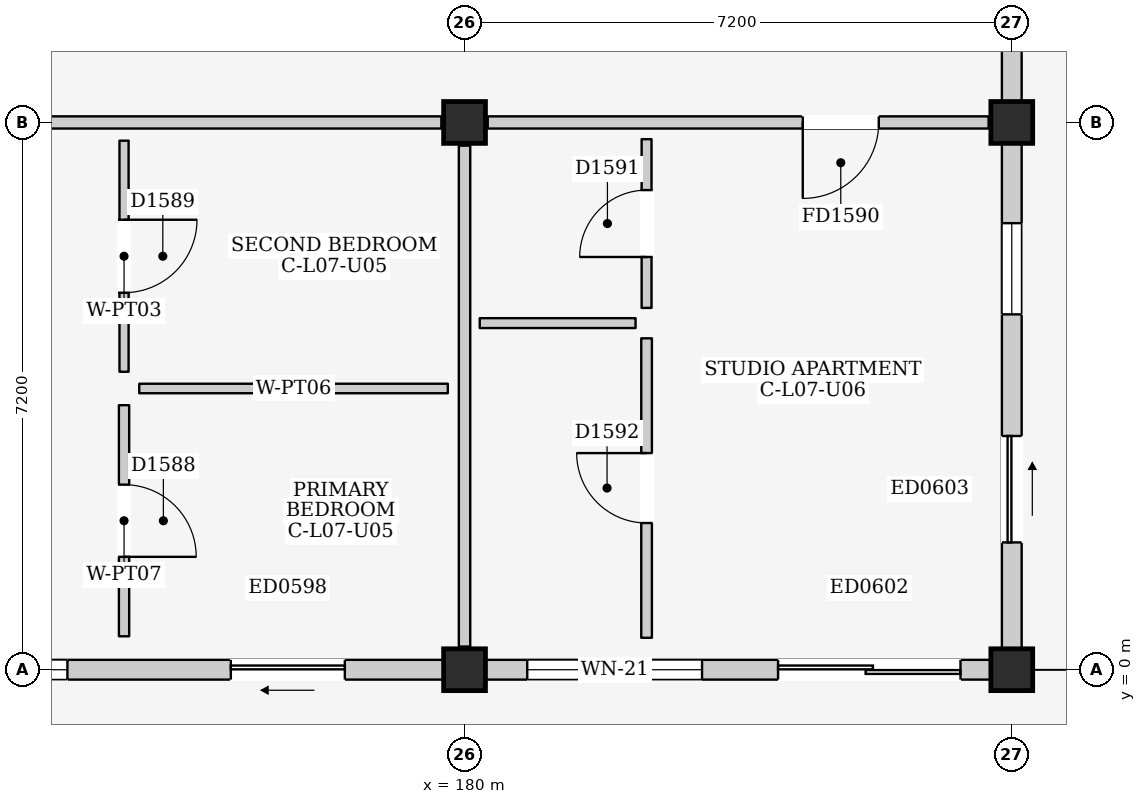
"""IFC4 building model, lengths in metres.
Left out: names, types, materials, properties, quantities, classifications, styles, units other than length and angle.
Written with IfcOpenShell. Run it as: python <this file> out.ifc"""

import sys

from ifc_helpers import new_model, si_unit, direction, frame, frame_2d, origin, origin_2d, place, context, subcontext, project, spatial, rectangle, extrude, element, fill, save


model = new_model("IFC4")
c1 = context("Model", 3, precision=1e-05, world=origin(), true_north=direction((0.0, 1.0)))
c2 = subcontext(c1, "Body", "Model", "MODEL_VIEW")
j1 = project(units=[si_unit("LENGTHUNIT", "METRE"), si_unit("PLANEANGLEUNIT", "RADIAN")], contexts=[c1])
p1 = place(None, origin())
s1 = spatial("IfcSite", under=j1, at=p1, CompositionType="ELEMENT")
p2 = place(p1, origin())
s2 = spatial("IfcBuilding", under=s1, at=p2, CompositionType="ELEMENT")
p3 = place(p2, frame((0.0, 0.0, 25.1)))
s3 = spatial("IfcBuildingStorey", under=s2, at=p3, CompositionType="ELEMENT", Elevation=25.1)
for number, where, z_axis, x_axis in (
    (1, (180.0, 0.0, 0.0), (0.0, 0.0, 1.0), (1.0, 0.0, 0.0)),
    (2, (180.0, 7.2, 0.0), (0.0, 0.0, 1.0), (1.0, 0.0, 0.0)),
    (3, (187.2, 0.0, 0.0), (0.0, 0.0, 1.0), (1.0, 0.0, 0.0)),
    (4, (187.2, 7.2, 0.0), (0.0, 0.0, 1.0), (1.0, 0.0, 0.0)),
):
    element("IfcColumn", number, at=place(p3, frame(where, z_axis=z_axis, x_axis=x_axis)), inside=s3, PredefinedType="COLUMN", context=c2, shape_type="SweptSolid", body=[
        extrude(rectangle(XDim=0.55, YDim=0.55, at=origin_2d()), origin(), (0.0, 0.0, 1.0), 3.2),
    ])
p4 = place(p3, frame((173.075, 0.0, 0.0), z_axis=(0.0, 0.0, 1.0), x_axis=(1.0, 0.0, 0.0)))
e5 = element("IfcWall", 5, at=p4, inside=s3, PredefinedType="ELEMENTEDWALL", context=c2, shape_type="SweptSolid", body=[
    extrude(rectangle(XDim=6.65, YDim=0.26, at=frame_2d((3.325, 0.0))), origin(), (0.0, 0.0, 1.0), 2.525),
])
p5 = place(p4, frame((3.85, 0.0, 0.0)))
e6 = element("IfcOpeningElement", 6, at=p5, cuts=e5, PredefinedType="OPENING", context=c2, shape_type="SweptSolid", body=[
    extrude(rectangle(XDim=1.5, YDim=2.12, at=frame_2d((0.75, 1.06))), frame((0.0, 0.145, 0.0), z_axis=(0.0, -1.0, 0.0), x_axis=(1.0, 0.0, 0.0)), (0.0, 0.0, 1.0), 0.29),
])
p6 = place(p4, frame((0.55, 0.0, 0.9)))
e7 = element("IfcOpeningElement", 7, at=p6, cuts=e5, PredefinedType="OPENING", context=c2, shape_type="SweptSolid", body=[
    extrude(rectangle(XDim=1.15, YDim=1.15, at=frame_2d((0.575, 0.575))), frame((0.0, 0.145, 0.0), z_axis=(0.0, -1.0, 0.0), x_axis=(1.0, 0.0, 0.0)), (0.0, 0.0, 1.0), 0.29),
])
p7 = place(p3, frame((180.275, 0.0, 0.0), z_axis=(0.0, 0.0, 1.0), x_axis=(1.0, 0.0, 0.0)))
e8 = element("IfcWall", 8, at=p7, inside=s3, PredefinedType="ELEMENTEDWALL", context=c2, shape_type="SweptSolid", body=[
    extrude(rectangle(XDim=6.65, YDim=0.26, at=frame_2d((3.325, 0.0))), origin(), (0.0, 0.0, 1.0), 2.525),
])
p8 = place(p7, frame((3.85, 0.0, 0.0)))
e9 = element("IfcOpeningElement", 9, at=p8, cuts=e8, PredefinedType="OPENING", context=c2, shape_type="SweptSolid", body=[
    extrude(rectangle(XDim=2.4, YDim=2.12, at=frame_2d((1.2, 1.06))), frame((0.0, 0.145, 0.0), z_axis=(0.0, -1.0, 0.0), x_axis=(1.0, 0.0, 0.0)), (0.0, 0.0, 1.0), 0.29),
])
p9 = place(p7, frame((0.55, 0.0, 0.815)))
e10 = element("IfcOpeningElement", 10, at=p9, cuts=e8, PredefinedType="OPENING", context=c2, shape_type="SweptSolid", body=[
    extrude(rectangle(XDim=2.3, YDim=1.6, at=frame_2d((1.15, 0.8))), frame((0.0, 0.145, 0.0), z_axis=(0.0, -1.0, 0.0), x_axis=(1.0, 0.0, 0.0)), (0.0, 0.0, 1.0), 0.29),
])
p10 = place(p3, frame((187.2, 0.275, 0.0), z_axis=(0.0, 0.0, 1.0), x_axis=(0.0, 1.0, 0.0)))
e11 = element("IfcWall", 11, at=p10, inside=s3, PredefinedType="ELEMENTEDWALL", context=c2, shape_type="SweptSolid", body=[
    extrude(rectangle(XDim=6.65, YDim=0.26, at=frame_2d((3.325, 0.0))), origin(), (0.0, 0.0, 1.0), 2.525),
])
p11 = place(p10, frame((1.4, 0.0, 0.0)))
e12 = element("IfcOpeningElement", 12, at=p11, cuts=e11, PredefinedType="OPENING", context=c2, shape_type="SweptSolid", body=[
    extrude(rectangle(XDim=1.4, YDim=2.1, at=frame_2d((0.7, 1.05))), frame((0.0, 0.145, 0.0), z_axis=(0.0, -1.0, 0.0), x_axis=(1.0, 0.0, 0.0)), (0.0, 0.0, 1.0), 0.29),
])
p12 = place(p10, frame((4.4, 0.0, 0.95)))
e13 = element("IfcOpeningElement", 13, at=p12, cuts=e11, PredefinedType="OPENING", context=c2, shape_type="SweptSolid", body=[
    extrude(rectangle(XDim=1.2, YDim=1.35, at=frame_2d((0.6, 0.675))), frame((0.0, 0.145, 0.0), z_axis=(0.0, -1.0, 0.0), x_axis=(1.0, 0.0, 0.0)), (0.0, 0.0, 1.0), 0.29),
])
p13 = place(p3, frame((187.2, 7.475, 0.0), z_axis=(0.0, 0.0, 1.0), x_axis=(0.0, 1.0, 0.0)))
e14 = element("IfcWall", 14, at=p13, inside=s3, PredefinedType="ELEMENTEDWALL", context=c2, shape_type="SweptSolid", body=[
    extrude(rectangle(XDim=6.65, YDim=0.26, at=frame_2d((3.325, 0.0))), origin(), (0.0, 0.0, 1.0), 2.525),
])
p14 = place(p13, frame((3.65, 0.0, 0.0)))
e15 = element("IfcOpeningElement", 15, at=p14, cuts=e14, PredefinedType="OPENING", context=c2, shape_type="SweptSolid", body=[
    extrude(rectangle(XDim=1.4, YDim=2.1, at=frame_2d((0.7, 1.05))), frame((0.0, 0.145, 0.0), z_axis=(0.0, -1.0, 0.0), x_axis=(1.0, 0.0, 0.0)), (0.0, 0.0, 1.0), 0.29),
])
p15 = place(p3, frame((173.105, 7.2, 0.0), z_axis=(0.0, 0.0, 1.0), x_axis=(1.0, 0.0, 0.0)))
e16 = element("IfcWall", 16, at=p15, inside=s3, PredefinedType="PARTITIONING", context=c2, shape_type="SweptSolid", body=[
    extrude(rectangle(XDim=6.59, YDim=0.16, at=frame_2d((3.295, 0.0))), origin(), (0.0, 0.0, 1.0), 2.375),
])
p16 = place(p15, frame((0.18, 0.0, 0.0)))
e17 = element("IfcOpeningElement", 17, at=p16, cuts=e16, PredefinedType="OPENING", context=c2, shape_type="SweptSolid", body=[
    extrude(rectangle(XDim=1.0, YDim=2.15, at=frame_2d((0.5, 1.075))), frame((0.0, 0.095, 0.0), z_axis=(0.0, -1.0, 0.0), x_axis=(1.0, 0.0, 0.0)), (0.0, 0.0, 1.0), 0.19),
])
p17 = place(p3, frame((180.0, 0.305, 0.0), z_axis=(0.0, 0.0, 1.0), x_axis=(0.0, 1.0, 0.0)))
e18 = element("IfcWall", 18, at=p17, inside=s3, PredefinedType="PARTITIONING", context=c2, shape_type="SweptSolid", body=[
    extrude(rectangle(XDim=6.59, YDim=0.15, at=frame_2d((3.295, 0.0))), origin(), (0.0, 0.0, 1.0), 2.475),
])
p18 = place(p3, frame((175.52, 0.44, 0.0), z_axis=(0.0, 0.0, 1.0), x_axis=(0.0, 1.0, 0.0)))
e19 = element("IfcWall", 19, at=p18, inside=s3, PredefinedType="PARTITIONING", context=c2, shape_type="SweptSolid", body=[
    extrude(rectangle(XDim=3.04, YDim=0.135, at=frame_2d((1.52, 0.0))), origin(), (0.0, 0.0, 1.0), 2.99),
])
p19 = place(p18, frame((1.045, 0.0, 0.0)))
e20 = element("IfcOpeningElement", 20, at=p19, cuts=e19, PredefinedType="OPENING", context=c2, shape_type="SweptSolid", body=[
    extrude(rectangle(XDim=0.95, YDim=2.15, at=frame_2d((0.475, 1.075))), frame((0.0, 0.083, 0.0), z_axis=(0.0, -1.0, 0.0), x_axis=(1.0, 0.0, 0.0)), (0.0, 0.0, 1.0), 0.165),
])
p20 = place(p3, frame((175.72, 3.7, 0.0), z_axis=(0.0, 0.0, 1.0), x_axis=(1.0, 0.0, 0.0)))
e21 = element("IfcWall", 21, at=p20, inside=s3, PredefinedType="PARTITIONING", context=c2, shape_type="SweptSolid", body=[
    extrude(rectangle(XDim=4.06, YDim=0.125, at=frame_2d((2.03, 0.0))), origin(), (0.0, 0.0, 1.0), 2.99),
])
p21 = place(p3, frame((175.52, 3.92, 0.0), z_axis=(0.0, 0.0, 1.0), x_axis=(0.0, 1.0, 0.0)))
e22 = element("IfcWall", 22, at=p21, inside=s3, PredefinedType="PARTITIONING", context=c2, shape_type="SweptSolid", body=[
    extrude(rectangle(XDim=3.04, YDim=0.12, at=frame_2d((1.52, 0.0))), origin(), (0.0, 0.0, 1.0), 2.99),
])
p22 = place(p21, frame((1.04, 0.0, 0.0)))
e23 = element("IfcOpeningElement", 23, at=p22, cuts=e22, PredefinedType="OPENING", context=c2, shape_type="SweptSolid", body=[
    extrude(rectangle(XDim=0.96, YDim=2.15, at=frame_2d((0.48, 1.075))), frame((0.0, 0.075, 0.0), z_axis=(0.0, -1.0, 0.0), x_axis=(1.0, 0.0, 0.0)), (0.0, 0.0, 1.0), 0.15),
])
p23 = place(p3, frame((180.305, 7.2, 0.0), z_axis=(0.0, 0.0, 1.0), x_axis=(1.0, 0.0, 0.0)))
e24 = element("IfcWall", 24, at=p23, inside=s3, PredefinedType="PARTITIONING", context=c2, shape_type="SweptSolid", body=[
    extrude(rectangle(XDim=6.59, YDim=0.16, at=frame_2d((3.295, 0.0))), origin(), (0.0, 0.0, 1.0), 2.375),
])
p24 = place(p23, frame((4.145, 0.0, 0.0)))
e25 = element("IfcOpeningElement", 25, at=p24, cuts=e24, PredefinedType="OPENING", context=c2, shape_type="SweptSolid", body=[
    extrude(rectangle(XDim=1.0, YDim=2.15, at=frame_2d((0.5, 1.075))), frame((0.0, 0.095, 0.0), z_axis=(0.0, -1.0, 0.0), x_axis=(1.0, 0.0, 0.0)), (0.0, 0.0, 1.0), 0.19),
])
p25 = place(p3, frame((180.2, 4.56, 0.0), z_axis=(0.0, 0.0, 1.0), x_axis=(1.0, 0.0, 0.0)))
e26 = element("IfcWall", 26, at=p25, inside=s3, PredefinedType="PARTITIONING", context=c2, shape_type="SweptSolid", body=[
    extrude(rectangle(XDim=2.05, YDim=0.13, at=frame_2d((1.025, 0.0))), origin(), (0.0, 0.0, 1.0), 2.99),
])
p26 = place(p3, frame((182.395, 4.76, 0.0), z_axis=(0.0, 0.0, 1.0), x_axis=(0.0, 1.0, 0.0)))
e27 = element("IfcWall", 27, at=p26, inside=s3, PredefinedType="PARTITIONING", context=c2, shape_type="SweptSolid", body=[
    extrude(rectangle(XDim=2.22, YDim=0.13, at=frame_2d((1.11, 0.0))), origin(), (0.0, 0.0, 1.0), 2.99),
])
p27 = place(p26, frame((0.67, 0.0, 0.0)))
e28 = element("IfcOpeningElement", 28, at=p27, cuts=e27, PredefinedType="OPENING", context=c2, shape_type="SweptSolid", body=[
    extrude(rectangle(XDim=0.88, YDim=2.1, at=frame_2d((0.44, 1.05))), frame((0.0, 0.08, 0.0), z_axis=(0.0, -1.0, 0.0), x_axis=(1.0, 0.0, 0.0)), (0.0, 0.0, 1.0), 0.16),
])
p28 = place(p3, frame((182.395, 0.42, 0.0), z_axis=(0.0, 0.0, 1.0), x_axis=(0.0, 1.0, 0.0)))
e29 = element("IfcWall", 29, at=p28, inside=s3, PredefinedType="PARTITIONING", context=c2, shape_type="SweptSolid", body=[
    extrude(rectangle(XDim=3.94, YDim=0.14, at=frame_2d((1.97, 0.0))), origin(), (0.0, 0.0, 1.0), 2.99),
])
p29 = place(p28, frame((1.51, 0.0, 0.0)))
e30 = element("IfcOpeningElement", 30, at=p29, cuts=e29, PredefinedType="OPENING", context=c2, shape_type="SweptSolid", body=[
    extrude(rectangle(XDim=0.92, YDim=2.1, at=frame_2d((0.46, 1.05))), frame((0.0, 0.085, 0.0), z_axis=(0.0, -1.0, 0.0), x_axis=(1.0, 0.0, 0.0)), (0.0, 0.0, 1.0), 0.17),
])
p30 = place(p5, frame((1.5, 0.0, 0.0), z_axis=(0.0, 0.0, 1.0), x_axis=(-1.0, 0.0, 0.0)))
e31 = element("IfcDoor", 31, at=p30, inside=s3, OperationType="SLIDING_TO_LEFT", PredefinedType="DOOR", context=c2, shape_type="SweptSolid", body=[
    extrude(rectangle(XDim=1.5, YDim=2.12, at=frame_2d((0.75, 1.06))), frame((0.0, 0.025, 0.0), z_axis=(0.0, -1.0, 0.0), x_axis=(1.0, 0.0, 0.0)), (0.0, 0.0, 1.0), 0.05),
])
fill(e6, e31)
p31 = place(p6, origin())
e32 = element("IfcWindow", 32, at=p31, inside=s3, PartitioningType="SINGLE_PANEL", PredefinedType="WINDOW", context=c2, shape_type="SweptSolid", body=[
    extrude(rectangle(XDim=1.15, YDim=1.15, at=frame_2d((0.575, 0.575))), frame((0.0, 0.03, 0.0), z_axis=(0.0, -1.0, 0.0), x_axis=(1.0, 0.0, 0.0)), (0.0, 0.0, 1.0), 0.06),
])
fill(e7, e32)
p32 = place(p8, frame((2.4, 0.0, 0.0), z_axis=(0.0, 0.0, 1.0), x_axis=(-1.0, 0.0, 0.0)))
e33 = element("IfcDoor", 33, at=p32, inside=s3, OperationType="DOUBLE_DOOR_SLIDING", PredefinedType="DOOR", context=c2, shape_type="SweptSolid", body=[
    extrude(rectangle(XDim=2.4, YDim=2.12, at=frame_2d((1.2, 1.06))), frame((0.0, 0.025, 0.0), z_axis=(0.0, -1.0, 0.0), x_axis=(1.0, 0.0, 0.0)), (0.0, 0.0, 1.0), 0.05),
])
fill(e9, e33)
p33 = place(p9, origin())
e34 = element("IfcWindow", 34, at=p33, inside=s3, PartitioningType="TRIPLE_PANEL_VERTICAL", PredefinedType="WINDOW", context=c2, shape_type="SweptSolid", body=[
    extrude(rectangle(XDim=2.3, YDim=1.6, at=frame_2d((1.15, 0.8))), frame((0.0, 0.03, 0.0), z_axis=(0.0, -1.0, 0.0), x_axis=(1.0, 0.0, 0.0)), (0.0, 0.0, 1.0), 0.06),
])
fill(e10, e34)
p34 = place(p11, frame((1.4, 0.0, 0.0), z_axis=(0.0, 0.0, 1.0), x_axis=(-1.0, 0.0, 0.0)))
e35 = element("IfcDoor", 35, at=p34, inside=s3, OperationType="SLIDING_TO_RIGHT", PredefinedType="DOOR", context=c2, shape_type="SweptSolid", body=[
    extrude(rectangle(XDim=1.4, YDim=2.1, at=frame_2d((0.7, 1.05))), frame((0.0, 0.025, 0.0), z_axis=(0.0, -1.0, 0.0), x_axis=(1.0, 0.0, 0.0)), (0.0, 0.0, 1.0), 0.05),
])
fill(e12, e35)
p35 = place(p12, origin())
e36 = element("IfcWindow", 36, at=p35, inside=s3, PartitioningType="SINGLE_PANEL", PredefinedType="WINDOW", context=c2, shape_type="SweptSolid", body=[
    extrude(rectangle(XDim=1.2, YDim=1.35, at=frame_2d((0.6, 0.675))), frame((0.0, 0.03, 0.0), z_axis=(0.0, -1.0, 0.0), x_axis=(1.0, 0.0, 0.0)), (0.0, 0.0, 1.0), 0.06),
])
fill(e13, e36)
p36 = place(p19, frame((0.95, 0.0, 0.0), z_axis=(0.0, 0.0, 1.0), x_axis=(-1.0, 0.0, 0.0)))
e37 = element("IfcDoor", 37, at=p36, inside=s3, OperationType="SINGLE_SWING_RIGHT", PredefinedType="DOOR", context=c2, shape_type="SweptSolid", body=[
    extrude(rectangle(XDim=0.95, YDim=2.15, at=frame_2d((0.475, 1.075))), frame((0.0, 0.025, 0.0), z_axis=(0.0, -1.0, 0.0), x_axis=(1.0, 0.0, 0.0)), (0.0, 0.0, 1.0), 0.05),
])
fill(e20, e37)
p37 = place(p22, frame((0.96, 0.0, 0.0), z_axis=(0.0, 0.0, 1.0), x_axis=(-1.0, 0.0, 0.0)))
e38 = element("IfcDoor", 38, at=p37, inside=s3, OperationType="SINGLE_SWING_LEFT", PredefinedType="DOOR", context=c2, shape_type="SweptSolid", body=[
    extrude(rectangle(XDim=0.96, YDim=2.15, at=frame_2d((0.48, 1.075))), frame((0.0, 0.025, 0.0), z_axis=(0.0, -1.0, 0.0), x_axis=(1.0, 0.0, 0.0)), (0.0, 0.0, 1.0), 0.05),
])
fill(e23, e38)
p38 = place(p24, frame((1.0, 0.0, 0.0), z_axis=(0.0, 0.0, 1.0), x_axis=(-1.0, 0.0, 0.0)))
e39 = element("IfcDoor", 39, at=p38, inside=s3, OperationType="SINGLE_SWING_RIGHT", PredefinedType="DOOR", context=c2, shape_type="SweptSolid", body=[
    extrude(rectangle(XDim=1.0, YDim=2.15, at=frame_2d((0.5, 1.075))), frame((0.0, 0.025, 0.0), z_axis=(0.0, -1.0, 0.0), x_axis=(1.0, 0.0, 0.0)), (0.0, 0.0, 1.0), 0.05),
])
fill(e25, e39)
p39 = place(p27, origin())
e40 = element("IfcDoor", 40, at=p39, inside=s3, OperationType="SINGLE_SWING_LEFT", PredefinedType="DOOR", context=c2, shape_type="SweptSolid", body=[
    extrude(rectangle(XDim=0.88, YDim=2.1, at=frame_2d((0.44, 1.05))), frame((0.0, 0.025, 0.0), z_axis=(0.0, -1.0, 0.0), x_axis=(1.0, 0.0, 0.0)), (0.0, 0.0, 1.0), 0.05),
])
fill(e28, e40)
p40 = place(p29, origin())
e41 = element("IfcDoor", 41, at=p40, inside=s3, OperationType="SINGLE_SWING_RIGHT", PredefinedType="DOOR", context=c2, shape_type="SweptSolid", body=[
    extrude(rectangle(XDim=0.92, YDim=2.1, at=frame_2d((0.46, 1.05))), frame((0.0, 0.025, 0.0), z_axis=(0.0, -1.0, 0.0), x_axis=(1.0, 0.0, 0.0)), (0.0, 0.0, 1.0), 0.05),
])
fill(e30, e41)
save(model, sys.argv[1])
